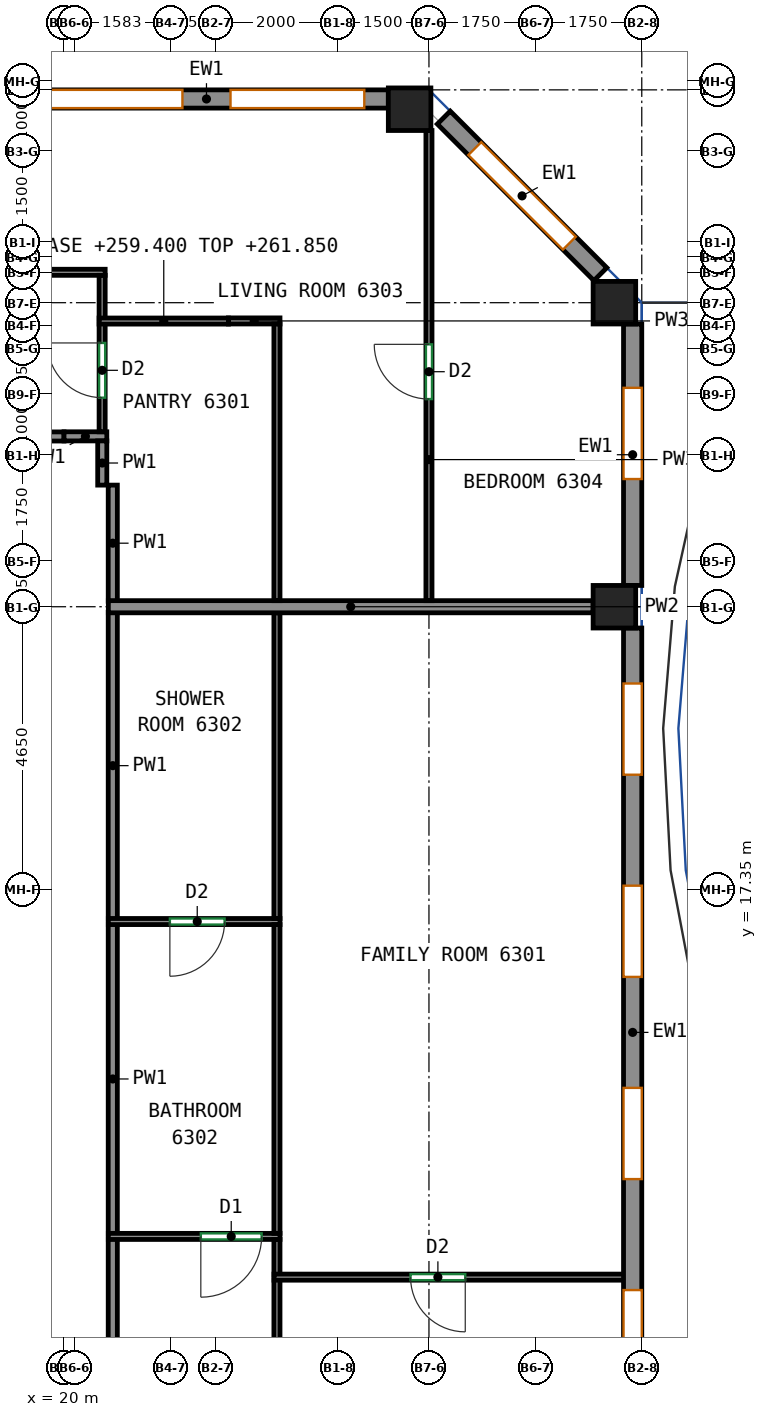
"""IFC4 building model, lengths in metres.
Left out: names, types, materials, properties, quantities, classifications, styles, units other than length and angle.
Written with IfcOpenShell. Run it as: python <this file> out.ifc"""

import sys

from ifc_helpers import new_model, si_unit, direction, frame, frame_2d, origin, origin_2d, place, context, subcontext, project, spatial, rectangle, extrude, source, transform, mapped, element, fill, save


model = new_model("IFC4")
c1 = context("Model", 3, precision=1e-05, world=origin(), true_north=direction((0.0, 1.0)))
c2 = subcontext(c1, "Body", "Model", "MODEL_VIEW")
j1 = project(units=[si_unit("LENGTHUNIT", "METRE"), si_unit("PLANEANGLEUNIT", "RADIAN")], contexts=[c1])
p1 = place(None, origin())
s1 = spatial("IfcSite", under=j1, at=p1, CompositionType="ELEMENT")
p2 = place(p1, origin())
s2 = spatial("IfcBuilding", under=s1, at=p2, CompositionType="ELEMENT")
p3 = place(p2, frame((0.0, 0.0, 259.4)))
s3 = spatial("IfcBuildingStorey", under=s2, at=p3, CompositionType="ELEMENT", Elevation=259.4)
m1 = source(origin(), c2, "Body", "SweptSolid", [
    extrude(rectangle(XDim=0.7, YDim=0.7, at=origin_2d()), origin(), (0.0, 0.0, 1.0), 3.0),
])
for number, where, z_axis, x_axis in (
    (1, (25.682, 30.182, 0.0), (0.0, 0.0, 1.0), (1.0, 0.0, 0.0)),
    (2, (29.05, 22.0, 0.0), (0.0, 0.0, 1.0), (1.0, 0.0, 0.0)),
    (3, (29.05, 27.0, 0.0), (0.0, 0.0, 1.0), (1.0, 0.0, 0.0)),
):
    element("IfcColumn", number, at=place(p3, frame(where, z_axis=z_axis, x_axis=x_axis)), inside=s3, PredefinedType="COLUMN", context=c2, shape_type="MappedRepresentation", body=[
        mapped(m1, transform((0.0, 0.0, 0.0))),
    ])
m2 = source(origin(), c2, "Body", "SweptSolid", [
    extrude(rectangle(XDim=13.3, YDim=0.3, at=frame_2d((6.65, 0.0))), origin(), (0.0, 0.0, 1.0), 3.0),
])
p4 = place(p3, frame((29.35, 8.35, 0.0), z_axis=(0.0, 0.0, 1.0), x_axis=(0.0, 1.0, 0.0)))
e4 = element("IfcWall", 4, at=p4, inside=s3, PredefinedType="SOLIDWALL", context=c2, shape_type="MappedRepresentation", body=[
    mapped(m2, transform((0.0, 0.0, 0.0))),
])
p5 = place(p4, frame((0.913, 0.0, 0.8)))
e5 = element("IfcOpeningElement", 5, at=p5, cuts=e4, PredefinedType="OPENING", context=c2, shape_type="SweptSolid", body=[
    extrude(rectangle(XDim=1.5, YDim=2.05, at=frame_2d((0.75, 1.025))), frame((0.0, 0.16, 0.0), z_axis=(0.0, -1.0, 0.0), x_axis=(1.0, 0.0, 0.0)), (0.0, 0.0, 1.0), 0.32),
])
p6 = place(p4, frame((4.238, 0.0, 0.8)))
e6 = element("IfcOpeningElement", 6, at=p6, cuts=e4, PredefinedType="OPENING", context=c2, shape_type="SweptSolid", body=[
    extrude(rectangle(XDim=1.5, YDim=2.05, at=frame_2d((0.75, 1.025))), frame((0.0, 0.16, 0.0), z_axis=(0.0, -1.0, 0.0), x_axis=(1.0, 0.0, 0.0)), (0.0, 0.0, 1.0), 0.32),
])
p7 = place(p4, frame((7.562, 0.0, 0.8)))
e7 = element("IfcOpeningElement", 7, at=p7, cuts=e4, PredefinedType="OPENING", context=c2, shape_type="SweptSolid", body=[
    extrude(rectangle(XDim=1.5, YDim=2.05, at=frame_2d((0.75, 1.025))), frame((0.0, 0.16, 0.0), z_axis=(0.0, -1.0, 0.0), x_axis=(1.0, 0.0, 0.0)), (0.0, 0.0, 1.0), 0.32),
])
p8 = place(p4, frame((10.887, 0.0, 0.8)))
e8 = element("IfcOpeningElement", 8, at=p8, cuts=e4, PredefinedType="OPENING", context=c2, shape_type="SweptSolid", body=[
    extrude(rectangle(XDim=1.5, YDim=2.05, at=frame_2d((0.75, 1.025))), frame((0.0, 0.16, 0.0), z_axis=(0.0, -1.0, 0.0), x_axis=(1.0, 0.0, 0.0)), (0.0, 0.0, 1.0), 0.32),
])
m3 = source(origin(), c2, "Body", "SweptSolid", [
    extrude(rectangle(XDim=4.3, YDim=0.3, at=frame_2d((2.15, 0.0))), origin(), (0.0, 0.0, 1.0), 3.0),
])
p9 = place(p3, frame((29.35, 22.35, 0.0), z_axis=(0.0, 0.0, 1.0), x_axis=(0.0, 1.0, 0.0)))
e9 = element("IfcWall", 9, at=p9, inside=s3, PredefinedType="SOLIDWALL", context=c2, shape_type="MappedRepresentation", body=[
    mapped(m3, transform((0.0, 0.0, 0.0))),
])
p10 = place(p9, frame((1.75, 0.0, 0.8)))
e10 = element("IfcOpeningElement", 10, at=p10, cuts=e9, PredefinedType="OPENING", context=c2, shape_type="SweptSolid", body=[
    extrude(rectangle(XDim=1.5, YDim=2.05, at=frame_2d((0.75, 1.025))), frame((0.0, 0.16, 0.0), z_axis=(0.0, -1.0, 0.0), x_axis=(1.0, 0.0, 0.0)), (0.0, 0.0, 1.0), 0.32),
])
m4 = source(origin(), c2, "Body", "SweptSolid", [
    extrude(rectangle(XDim=3.642, YDim=0.3, at=frame_2d((1.821, 0.0))), origin(), (0.0, 0.0, 1.0), 3.0),
])
p11 = place(p3, frame((28.819, 27.469, 0.0), z_axis=(0.0, 0.0, 1.0), x_axis=(-0.707106781187, 0.707106781187, 0.0)))
e11 = element("IfcWall", 11, at=p11, inside=s3, PredefinedType="SOLIDWALL", context=c2, shape_type="MappedRepresentation", body=[
    mapped(m4, transform((0.0, 0.0, 0.0))),
])
p12 = place(p11, frame((0.721, 0.0, 0.8)))
e12 = element("IfcOpeningElement", 12, at=p12, cuts=e11, PredefinedType="OPENING", context=c2, shape_type="SweptSolid", body=[
    extrude(rectangle(XDim=2.2, YDim=2.05, at=frame_2d((1.1, 1.025))), frame((0.0, 0.16, 0.0), z_axis=(0.0, -1.0, 0.0), x_axis=(1.0, 0.0, 0.0)), (0.0, 0.0, 1.0), 0.32),
])
m5 = source(origin(), c2, "Body", "SweptSolid", [
    extrude(rectangle(XDim=5.982, YDim=0.3, at=frame_2d((2.991, 0.0))), origin(), (0.0, 0.0, 1.0), 3.0),
])
p13 = place(p3, frame((25.332, 30.35, 0.0), z_axis=(0.0, 0.0, 1.0), x_axis=(-1.0, 0.0, 0.0)))
e13 = element("IfcWall", 13, at=p13, inside=s3, PredefinedType="SOLIDWALL", context=c2, shape_type="MappedRepresentation", body=[
    mapped(m5, transform((0.0, 0.0, 0.0))),
])
p14 = place(p13, frame((0.396, 0.0, 0.8)))
e14 = element("IfcOpeningElement", 14, at=p14, cuts=e13, PredefinedType="OPENING", context=c2, shape_type="SweptSolid", body=[
    extrude(rectangle(XDim=2.2, YDim=2.05, at=frame_2d((1.1, 1.025))), frame((0.0, 0.16, 0.0), z_axis=(0.0, -1.0, 0.0), x_axis=(1.0, 0.0, 0.0)), (0.0, 0.0, 1.0), 0.32),
])
p15 = place(p13, frame((3.386, 0.0, 0.8)))
e15 = element("IfcOpeningElement", 15, at=p15, cuts=e13, PredefinedType="OPENING", context=c2, shape_type="SweptSolid", body=[
    extrude(rectangle(XDim=2.2, YDim=2.05, at=frame_2d((1.1, 1.025))), frame((0.0, 0.16, 0.0), z_axis=(0.0, -1.0, 0.0), x_axis=(1.0, 0.0, 0.0)), (0.0, 0.0, 1.0), 0.32),
])
p16 = place(p3, frame((-16.075, 24.8, 0.0), z_axis=(0.0, 0.0, 1.0), x_axis=(1.0, 0.0, 0.0)))
e16 = element("IfcWall", 16, at=p16, inside=s3, PredefinedType="PARTITIONING", context=c2, shape_type="SweptSolid", body=[
    extrude(rectangle(XDim=36.073, YDim=0.15, at=frame_2d((18.037, 0.0))), origin(), (0.0, 0.0, 1.0), 3.0),
])
p17 = place(p16, frame((5.919, 0.0, 0.0)))
e17 = element("IfcOpeningElement", 17, at=p17, cuts=e16, PredefinedType="OPENING", context=c2, shape_type="SweptSolid", body=[
    extrude(rectangle(XDim=1.8, YDim=2.1, at=frame_2d((0.9, 1.05))), frame((0.0, 0.085, 0.0), z_axis=(0.0, -1.0, 0.0), x_axis=(1.0, 0.0, 0.0)), (0.0, 0.0, 1.0), 0.17),
])
p18 = place(p16, frame((31.887, 0.0, 0.0)))
e18 = element("IfcOpeningElement", 18, at=p18, cuts=e16, PredefinedType="OPENING", context=c2, shape_type="SweptSolid", body=[
    extrude(rectangle(XDim=1.0, YDim=2.1, at=frame_2d((0.5, 1.05))), frame((0.0, 0.085, 0.0), z_axis=(0.0, -1.0, 0.0), x_axis=(1.0, 0.0, 0.0)), (0.0, 0.0, 1.0), 0.17),
])
p19 = place(p3, frame((20.8, 0.24, 0.0), z_axis=(0.0, 0.0, 1.0), x_axis=(0.0, 1.0, 0.0)))
e19 = element("IfcWall", 19, at=p19, inside=s3, PredefinedType="PARTITIONING", context=c2, shape_type="SweptSolid", body=[
    extrude(rectangle(XDim=11.365, YDim=0.15, at=frame_2d((5.683, 0.0))), origin(), (0.0, 0.0, 1.0), 3.0),
])
p20 = place(p19, frame((0.905, 0.0, 0.0)))
e20 = element("IfcOpeningElement", 20, at=p20, cuts=e19, PredefinedType="OPENING", context=c2, shape_type="SweptSolid", body=[
    extrude(rectangle(XDim=1.0, YDim=2.1, at=frame_2d((0.5, 1.05))), frame((0.0, 0.085, 0.0), z_axis=(0.0, -1.0, 0.0), x_axis=(1.0, 0.0, 0.0)), (0.0, 0.0, 1.0), 0.17),
])
p21 = place(p3, frame((20.8, 11.685, 0.0), z_axis=(0.0, 0.0, 1.0), x_axis=(0.0, 1.0, 0.0)))
e21 = element("IfcWall", 21, at=p21, inside=s3, PredefinedType="PARTITIONING", context=c2, shape_type="SweptSolid", body=[
    extrude(rectangle(XDim=5.098, YDim=0.15, at=frame_2d((2.549, 0.0))), origin(), (0.0, 0.0, 1.0), 3.0),
])
p22 = place(p3, frame((20.8, 16.863, 0.0), z_axis=(0.0, 0.0, 1.0), x_axis=(0.0, 1.0, 0.0)))
e22 = element("IfcWall", 22, at=p22, inside=s3, PredefinedType="PARTITIONING", context=c2, shape_type="SweptSolid", body=[
    extrude(rectangle(XDim=5.047, YDim=0.15, at=frame_2d((2.523, 0.0))), origin(), (0.0, 0.0, 1.0), 3.0),
])
p23 = place(p3, frame((20.702, 24.802, 0.0), z_axis=(0.0, 0.0, 1.0), x_axis=(-1.0, 0.0, 0.0)))
e23 = element("IfcWall", 23, at=p23, inside=s3, PredefinedType="PARTITIONING", context=c2, shape_type="SweptSolid", body=[
    extrude(rectangle(XDim=0.704, YDim=0.15, at=frame_2d((0.352, 0.0))), origin(), (0.0, 0.0, 1.0), 3.0),
])
p24 = place(p3, frame((20.627, 24.0, 0.0), z_axis=(0.0, 0.0, 1.0), x_axis=(0.0, 1.0, 0.0)))
e24 = element("IfcWall", 24, at=p24, inside=s3, PredefinedType="PARTITIONING", context=c2, shape_type="SweptSolid", body=[
    extrude(rectangle(XDim=0.727, YDim=0.15, at=frame_2d((0.364, 0.0))), origin(), (0.0, 0.0, 1.0), 3.0),
])
p25 = place(p3, frame((20.8, 22.09, 0.0), z_axis=(0.0, 0.0, 1.0), x_axis=(0.0, 1.0, 0.0)))
e25 = element("IfcWall", 25, at=p25, inside=s3, PredefinedType="PARTITIONING", context=c2, shape_type="SweptSolid", body=[
    extrude(rectangle(XDim=1.91, YDim=0.15, at=frame_2d((0.955, 0.0))), origin(), (0.0, 0.0, 1.0), 3.0),
])
p26 = place(p3, frame((23.55, 11.645, 0.0), z_axis=(0.0, 0.0, 1.0), x_axis=(-1.0, 0.0, 0.0)))
e26 = element("IfcWall", 26, at=p26, inside=s3, PredefinedType="PARTITIONING", context=c2, shape_type="SweptSolid", body=[
    extrude(rectangle(XDim=2.823, YDim=0.1, at=frame_2d((1.412, 0.0))), origin(), (0.0, 0.0, 1.0), 3.0),
])
p27 = place(p26, frame((0.302, 0.0, 0.0)))
e27 = element("IfcOpeningElement", 27, at=p27, cuts=e26, PredefinedType="OPENING", context=c2, shape_type="SweptSolid", body=[
    extrude(rectangle(XDim=1.0, YDim=2.1, at=frame_2d((0.5, 1.05))), frame((0.0, 0.06, 0.0), z_axis=(0.0, -1.0, 0.0), x_axis=(1.0, 0.0, 0.0)), (0.0, 0.0, 1.0), 0.12),
])
p28 = place(p3, frame((23.5, 0.25, 0.0), z_axis=(0.0, 0.0, 1.0), x_axis=(0.0, 1.0, 0.0)))
e28 = element("IfcWall", 28, at=p28, inside=s3, PredefinedType="PARTITIONING", context=c2, shape_type="SweptSolid", body=[
    extrude(rectangle(XDim=10.685, YDim=0.1, at=frame_2d((5.343, 0.0))), origin(), (0.0, 0.0, 1.0), 3.0),
])
p29 = place(p28, frame((7.467, 0.0, 0.0)))
e29 = element("IfcOpeningElement", 29, at=p29, cuts=e28, PredefinedType="OPENING", context=c2, shape_type="SweptSolid", body=[
    extrude(rectangle(XDim=1.0, YDim=2.1, at=frame_2d((0.5, 1.05))), frame((0.0, 0.06, 0.0), z_axis=(0.0, -1.0, 0.0), x_axis=(1.0, 0.0, 0.0)), (0.0, 0.0, 1.0), 0.12),
])
p30 = place(p3, frame((23.5, 11.015, 0.0), z_axis=(0.0, 0.0, 1.0), x_axis=(0.0, 1.0, 0.0)))
e30 = element("IfcWall", 30, at=p30, inside=s3, PredefinedType="PARTITIONING", context=c2, shape_type="SweptSolid", body=[
    extrude(rectangle(XDim=0.58, YDim=0.1, at=frame_2d((0.29, 0.0))), origin(), (0.0, 0.0, 1.0), 3.0),
])
p31 = place(p3, frame((23.55, 16.823, 0.0), z_axis=(0.0, 0.0, 1.0), x_axis=(-1.0, 0.0, 0.0)))
e31 = element("IfcWall", 31, at=p31, inside=s3, PredefinedType="PARTITIONING", context=c2, shape_type="SweptSolid", body=[
    extrude(rectangle(XDim=2.823, YDim=0.1, at=frame_2d((1.412, 0.0))), origin(), (0.0, 0.0, 1.0), 3.0),
])
p32 = place(p31, frame((0.911, 0.0, 0.0)))
e32 = element("IfcOpeningElement", 32, at=p32, cuts=e31, PredefinedType="OPENING", context=c2, shape_type="SweptSolid", body=[
    extrude(rectangle(XDim=0.9, YDim=2.1, at=frame_2d((0.45, 1.05))), frame((0.0, 0.06, 0.0), z_axis=(0.0, -1.0, 0.0), x_axis=(1.0, 0.0, 0.0)), (0.0, 0.0, 1.0), 0.12),
])
p33 = place(p3, frame((23.5, 11.695, 0.0), z_axis=(0.0, 0.0, 1.0), x_axis=(0.0, 1.0, 0.0)))
e33 = element("IfcWall", 33, at=p33, inside=s3, PredefinedType="PARTITIONING", context=c2, shape_type="SweptSolid", body=[
    extrude(rectangle(XDim=5.078, YDim=0.1, at=frame_2d((2.539, 0.0))), origin(), (0.0, 0.0, 1.0), 3.0),
])
p34 = place(p3, frame((23.5, 16.873, 0.0), z_axis=(0.0, 0.0, 1.0), x_axis=(0.0, 1.0, 0.0)))
e34 = element("IfcWall", 34, at=p34, inside=s3, PredefinedType="PARTITIONING", context=c2, shape_type="SweptSolid", body=[
    extrude(rectangle(XDim=5.027, YDim=0.1, at=frame_2d((2.513, 0.0))), origin(), (0.0, 0.0, 1.0), 3.0),
])
p35 = place(p3, frame((20.727, 22.0, 0.0), z_axis=(0.0, 0.0, 1.0), x_axis=(1.0, 0.0, 0.0)))
e35 = element("IfcWall", 35, at=p35, inside=s3, PredefinedType="PARTITIONING", context=c2, shape_type="SweptSolid", body=[
    extrude(rectangle(XDim=7.973, YDim=0.2, at=frame_2d((3.986, 0.0))), origin(), (0.0, 0.0, 1.0), 2.45),
])
p36 = place(p3, frame((29.25, 10.975, 0.0), z_axis=(0.0, 0.0, 1.0), x_axis=(-1.0, 0.0, 0.0)))
e36 = element("IfcWall", 36, at=p36, inside=s3, PredefinedType="PARTITIONING", context=c2, shape_type="SweptSolid", body=[
    extrude(rectangle(XDim=5.798, YDim=0.1, at=frame_2d((2.899, 0.0))), origin(), (0.0, 0.0, 1.0), 3.0),
])
p37 = place(p36, frame((2.653, 0.0, 0.0)))
e37 = element("IfcOpeningElement", 37, at=p37, cuts=e36, PredefinedType="OPENING", context=c2, shape_type="SweptSolid", body=[
    extrude(rectangle(XDim=0.9, YDim=2.1, at=frame_2d((0.45, 1.05))), frame((0.0, 0.06, 0.0), z_axis=(0.0, -1.0, 0.0), x_axis=(1.0, 0.0, 0.0)), (0.0, 0.0, 1.0), 0.12),
])
p38 = place(p3, frame((11.9, 27.5, 0.0), z_axis=(0.0, 0.0, 1.0), x_axis=(1.0, 0.0, 0.0)))
e38 = element("IfcWall", 38, at=p38, inside=s3, PredefinedType="PARTITIONING", context=c2, shape_type="SweptSolid", body=[
    extrude(rectangle(XDim=8.775, YDim=0.1, at=frame_2d((4.388, 0.0))), origin(), (0.0, 0.0, 1.0), 3.0),
])
p39 = place(p38, frame((0.409, 0.0, 0.0)))
e39 = element("IfcOpeningElement", 39, at=p39, cuts=e38, PredefinedType="OPENING", context=c2, shape_type="SweptSolid", body=[
    extrude(rectangle(XDim=0.9, YDim=2.1, at=frame_2d((0.45, 1.05))), frame((0.0, 0.06, 0.0), z_axis=(0.0, -1.0, 0.0), x_axis=(1.0, 0.0, 0.0)), (0.0, 0.0, 1.0), 0.12),
])
p40 = place(p38, frame((4.113, 0.0, 0.0)))
e40 = element("IfcOpeningElement", 40, at=p40, cuts=e38, PredefinedType="OPENING", context=c2, shape_type="SweptSolid", body=[
    extrude(rectangle(XDim=1.0, YDim=2.1, at=frame_2d((0.5, 1.05))), frame((0.0, 0.06, 0.0), z_axis=(0.0, -1.0, 0.0), x_axis=(1.0, 0.0, 0.0)), (0.0, 0.0, 1.0), 0.12),
])
p41 = place(p3, frame((20.625, 24.877, 0.0), z_axis=(0.0, 0.0, 1.0), x_axis=(0.0, 1.0, 0.0)))
e41 = element("IfcWall", 41, at=p41, inside=s3, PredefinedType="PARTITIONING", context=c2, shape_type="SweptSolid", body=[
    extrude(rectangle(XDim=1.781, YDim=0.1, at=frame_2d((0.891, 0.0))), origin(), (0.0, 0.0, 1.0), 3.0),
])
p42 = place(p41, frame((0.561, 0.0, 0.0)))
e42 = element("IfcOpeningElement", 42, at=p42, cuts=e41, PredefinedType="OPENING", context=c2, shape_type="SweptSolid", body=[
    extrude(rectangle(XDim=0.9, YDim=2.1, at=frame_2d((0.45, 1.05))), frame((0.0, 0.06, 0.0), z_axis=(0.0, -1.0, 0.0), x_axis=(1.0, 0.0, 0.0)), (0.0, 0.0, 1.0), 0.12),
])
p43 = place(p3, frame((20.625, 26.738, 0.0), z_axis=(0.0, 0.0, 1.0), x_axis=(0.0, 1.0, 0.0)))
e43 = element("IfcWall", 43, at=p43, inside=s3, PredefinedType="PARTITIONING", context=c2, shape_type="SweptSolid", body=[
    extrude(rectangle(XDim=0.712, YDim=0.1, at=frame_2d((0.356, 0.0))), origin(), (0.0, 0.0, 1.0), 3.0),
])
p44 = place(p3, frame((22.702, 26.698, 0.0), z_axis=(0.0, 0.0, 1.0), x_axis=(-1.0, 0.0, 0.0)))
e44 = element("IfcWall", 44, at=p44, inside=s3, PredefinedType="PARTITIONING", context=c2, shape_type="SweptSolid", body=[
    extrude(rectangle(XDim=2.127, YDim=0.1, at=frame_2d((1.063, 0.0))), origin(), (0.0, 0.0, 1.0), 2.45),
])
p45 = place(p3, frame((23.55, 26.7, 0.0), z_axis=(0.0, 0.0, 1.0), x_axis=(-1.0, 0.0, 0.0)))
e45 = element("IfcWall", 45, at=p45, inside=s3, PredefinedType="PARTITIONING", context=c2, shape_type="SweptSolid", body=[
    extrude(rectangle(XDim=0.848, YDim=0.1, at=frame_2d((0.424, 0.0))), origin(), (0.0, 0.0, 1.0), 2.45),
])
p46 = place(p3, frame((23.5, 22.1, 0.0), z_axis=(0.0, 0.0, 1.0), x_axis=(0.0, 1.0, 0.0)))
e46 = element("IfcWall", 46, at=p46, inside=s3, PredefinedType="PARTITIONING", context=c2, shape_type="SweptSolid", body=[
    extrude(rectangle(XDim=4.55, YDim=0.1, at=frame_2d((2.275, 0.0))), origin(), (0.0, 0.0, 1.0), 3.0),
])
p47 = place(p3, frame((26.0, 22.1, 0.0), z_axis=(0.0, 0.0, 1.0), x_axis=(0.0, 1.0, 0.0)))
e47 = element("IfcWall", 47, at=p47, inside=s3, PredefinedType="PARTITIONING", context=c2, shape_type="SweptSolid", body=[
    extrude(rectangle(XDim=7.732, YDim=0.1, at=frame_2d((3.866, 0.0))), origin(), (0.0, 0.0, 1.0), 2.45),
])
p48 = place(p47, frame((3.315, 0.0, 0.0)))
e48 = element("IfcOpeningElement", 48, at=p48, cuts=e47, PredefinedType="OPENING", context=c2, shape_type="SweptSolid", body=[
    extrude(rectangle(XDim=0.9, YDim=2.1, at=frame_2d((0.45, 1.05))), frame((0.0, 0.06, 0.0), z_axis=(0.0, -1.0, 0.0), x_axis=(1.0, 0.0, 0.0)), (0.0, 0.0, 1.0), 0.12),
])
p49 = place(p5, origin())
e49 = element("IfcWindow", 49, at=p49, inside=s3, PartitioningType="SINGLE_PANEL", PredefinedType="WINDOW", context=c2, shape_type="SweptSolid", body=[
    extrude(rectangle(XDim=1.5, YDim=2.05, at=frame_2d((0.75, 1.025))), frame((0.0, 0.03, 0.0), z_axis=(0.0, -1.0, 0.0), x_axis=(1.0, 0.0, 0.0)), (0.0, 0.0, 1.0), 0.06),
])
fill(e5, e49)
p50 = place(p6, origin())
e50 = element("IfcWindow", 50, at=p50, inside=s3, PartitioningType="SINGLE_PANEL", PredefinedType="WINDOW", context=c2, shape_type="SweptSolid", body=[
    extrude(rectangle(XDim=1.5, YDim=2.05, at=frame_2d((0.75, 1.025))), frame((0.0, 0.03, 0.0), z_axis=(0.0, -1.0, 0.0), x_axis=(1.0, 0.0, 0.0)), (0.0, 0.0, 1.0), 0.06),
])
fill(e6, e50)
p51 = place(p7, origin())
e51 = element("IfcWindow", 51, at=p51, inside=s3, PartitioningType="SINGLE_PANEL", PredefinedType="WINDOW", context=c2, shape_type="SweptSolid", body=[
    extrude(rectangle(XDim=1.5, YDim=2.05, at=frame_2d((0.75, 1.025))), frame((0.0, 0.03, 0.0), z_axis=(0.0, -1.0, 0.0), x_axis=(1.0, 0.0, 0.0)), (0.0, 0.0, 1.0), 0.06),
])
fill(e7, e51)
p52 = place(p8, origin())
e52 = element("IfcWindow", 52, at=p52, inside=s3, PartitioningType="SINGLE_PANEL", PredefinedType="WINDOW", context=c2, shape_type="SweptSolid", body=[
    extrude(rectangle(XDim=1.5, YDim=2.05, at=frame_2d((0.75, 1.025))), frame((0.0, 0.03, 0.0), z_axis=(0.0, -1.0, 0.0), x_axis=(1.0, 0.0, 0.0)), (0.0, 0.0, 1.0), 0.06),
])
fill(e8, e52)
p53 = place(p10, origin())
e53 = element("IfcWindow", 53, at=p53, inside=s3, PartitioningType="SINGLE_PANEL", PredefinedType="WINDOW", context=c2, shape_type="SweptSolid", body=[
    extrude(rectangle(XDim=1.5, YDim=2.05, at=frame_2d((0.75, 1.025))), frame((0.0, 0.03, 0.0), z_axis=(0.0, -1.0, 0.0), x_axis=(1.0, 0.0, 0.0)), (0.0, 0.0, 1.0), 0.06),
])
fill(e10, e53)
p54 = place(p12, origin())
e54 = element("IfcWindow", 54, at=p54, inside=s3, PartitioningType="SINGLE_PANEL", PredefinedType="WINDOW", context=c2, shape_type="SweptSolid", body=[
    extrude(rectangle(XDim=2.2, YDim=2.05, at=frame_2d((1.1, 1.025))), frame((0.0, 0.03, 0.0), z_axis=(0.0, -1.0, 0.0), x_axis=(1.0, 0.0, 0.0)), (0.0, 0.0, 1.0), 0.06),
])
fill(e12, e54)
p55 = place(p14, origin())
e55 = element("IfcWindow", 55, at=p55, inside=s3, PartitioningType="SINGLE_PANEL", PredefinedType="WINDOW", context=c2, shape_type="SweptSolid", body=[
    extrude(rectangle(XDim=2.2, YDim=2.05, at=frame_2d((1.1, 1.025))), frame((0.0, 0.03, 0.0), z_axis=(0.0, -1.0, 0.0), x_axis=(1.0, 0.0, 0.0)), (0.0, 0.0, 1.0), 0.06),
])
fill(e14, e55)
p56 = place(p15, origin())
e56 = element("IfcWindow", 56, at=p56, inside=s3, PartitioningType="SINGLE_PANEL", PredefinedType="WINDOW", context=c2, shape_type="SweptSolid", body=[
    extrude(rectangle(XDim=2.2, YDim=2.05, at=frame_2d((1.1, 1.025))), frame((0.0, 0.03, 0.0), z_axis=(0.0, -1.0, 0.0), x_axis=(1.0, 0.0, 0.0)), (0.0, 0.0, 1.0), 0.06),
])
fill(e15, e56)
p57 = place(p37, origin())
e57 = element("IfcDoor", 57, at=p57, inside=s3, OperationType="SINGLE_SWING_LEFT", PredefinedType="DOOR", context=c2, shape_type="SweptSolid", body=[
    extrude(rectangle(XDim=0.9, YDim=2.1, at=frame_2d((0.45, 1.05))), frame((0.0, 0.025, 0.0), z_axis=(0.0, -1.0, 0.0), x_axis=(1.0, 0.0, 0.0)), (0.0, 0.0, 1.0), 0.05),
])
fill(e37, e57)
p58 = place(p27, origin())
e58 = element("IfcDoor", 58, at=p58, inside=s3, OperationType="SINGLE_SWING_RIGHT", PredefinedType="DOOR", context=c2, shape_type="SweptSolid", body=[
    extrude(rectangle(XDim=1.0, YDim=2.1, at=frame_2d((0.5, 1.05))), frame((0.0, 0.025, 0.0), z_axis=(0.0, -1.0, 0.0), x_axis=(1.0, 0.0, 0.0)), (0.0, 0.0, 1.0), 0.05),
])
fill(e27, e58)
p59 = place(p32, origin())
e59 = element("IfcDoor", 59, at=p59, inside=s3, OperationType="SINGLE_SWING_RIGHT", PredefinedType="DOOR", context=c2, shape_type="SweptSolid", body=[
    extrude(rectangle(XDim=0.9, YDim=2.1, at=frame_2d((0.45, 1.05))), frame((0.0, 0.025, 0.0), z_axis=(0.0, -1.0, 0.0), x_axis=(1.0, 0.0, 0.0)), (0.0, 0.0, 1.0), 0.05),
])
fill(e32, e59)
p60 = place(p48, origin())
e60 = element("IfcDoor", 60, at=p60, inside=s3, OperationType="SINGLE_SWING_RIGHT", PredefinedType="DOOR", context=c2, shape_type="SweptSolid", body=[
    extrude(rectangle(XDim=0.9, YDim=2.1, at=frame_2d((0.45, 1.05))), frame((0.0, 0.025, 0.0), z_axis=(0.0, -1.0, 0.0), x_axis=(1.0, 0.0, 0.0)), (0.0, 0.0, 1.0), 0.05),
])
fill(e48, e60)
p61 = place(p42, origin())
e61 = element("IfcDoor", 61, at=p61, inside=s3, OperationType="SINGLE_SWING_RIGHT", PredefinedType="DOOR", context=c2, shape_type="SweptSolid", body=[
    extrude(rectangle(XDim=0.9, YDim=2.1, at=frame_2d((0.45, 1.05))), frame((0.0, 0.025, 0.0), z_axis=(0.0, -1.0, 0.0), x_axis=(1.0, 0.0, 0.0)), (0.0, 0.0, 1.0), 0.05),
])
fill(e42, e61)
save(model, sys.argv[1])
